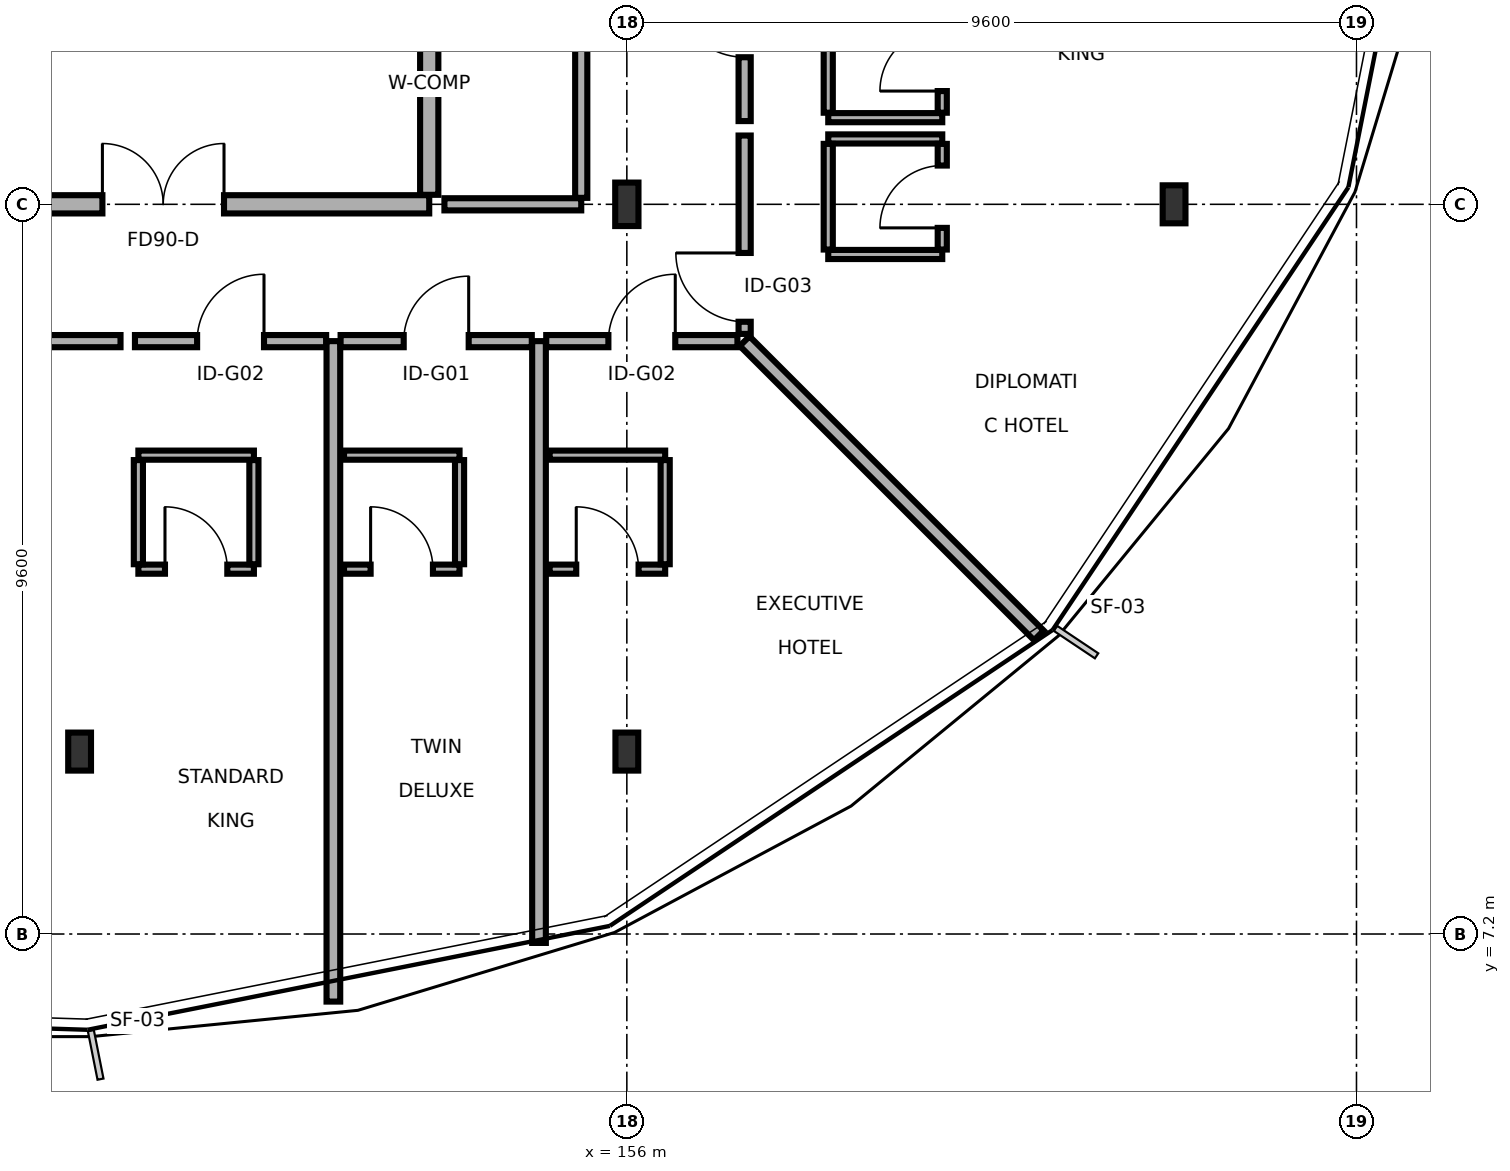
"""IFC4 building model, lengths in metres.
Left out: names, types, materials, properties, quantities, classifications, styles, units other than length and angle.
Written with IfcOpenShell. Run it as: python <this file> out.ifc"""

import sys

from ifc_helpers import new_model, si_unit, direction, frame, frame_2d, origin, origin_2d, place, context, subcontext, project, spatial, rectangle, i_section, extrude, element, fill, save


model = new_model("IFC4")
c1 = context("Model", 3, precision=1e-05, world=origin(), true_north=direction((0.0, 1.0)))
c2 = subcontext(c1, "Body", "Model", "MODEL_VIEW")
j1 = project(units=[si_unit("LENGTHUNIT", "METRE"), si_unit("PLANEANGLEUNIT", "RADIAN")], contexts=[c1])
p1 = place(None, origin())
s1 = spatial("IfcSite", under=j1, at=p1, CompositionType="ELEMENT")
p2 = place(p1, origin())
s2 = spatial("IfcBuilding", under=s1, at=p2, CompositionType="ELEMENT")
p3 = place(p2, frame((0.0, 0.0, 24.9)))
s3 = spatial("IfcBuildingStorey", under=s2, at=p3, CompositionType="ELEMENT", Elevation=24.9)
p4 = place(p3, frame((156.0, 16.8, 0.0), z_axis=(0.0, 0.0, 1.0), x_axis=(1.0, 0.0, 0.0)))
e1 = element("IfcColumn", 1, at=p4, inside=s3, PredefinedType="COLUMN", context=c2, shape_type="SweptSolid", body=[
    extrude(i_section(OverallWidth=0.306, OverallDepth=0.572, WebThickness=0.021, FlangeThickness=0.04, FilletRadius=0.027, at=origin_2d()), origin(), (0.0, 0.0, 1.0), 3.4),
])
for number, where, z_axis, x_axis in (
    (2, (148.8, 9.6, 0.0), (0.0, 0.0, 1.0), (1.0, 0.0, 0.0)),
    (3, (156.0, 9.6, 0.0), (0.0, 0.0, 1.0), (1.0, 0.0, 0.0)),
    (4, (163.2, 16.8, 0.0), (0.0, 0.0, 1.0), (1.0, 0.0, 0.0)),
):
    element("IfcColumn", number, at=place(p3, frame(where, z_axis=z_axis, x_axis=x_axis)), inside=s3, PredefinedType="COLUMN", context=c2, shape_type="SweptSolid", body=[
        extrude(i_section(OverallWidth=0.3, OverallDepth=0.5, WebThickness=0.014, FlangeThickness=0.028, FilletRadius=0.027, at=origin_2d()), origin(), (0.0, 0.0, 1.0), 3.4),
    ])
p5 = place(p3, frame((146.4, 16.8, 0.0), z_axis=(0.0, 0.0, 1.0), x_axis=(1.0, 0.0, 0.0)))
e5 = element("IfcWall", 5, at=p5, inside=s3, PredefinedType="SOLIDWALL", context=c2, shape_type="SweptSolid", body=[
    extrude(rectangle(XDim=7.0, YDim=0.24, at=frame_2d((3.5, 0.0))), origin(), (0.0, 0.0, 1.0), 2.725),
])
p6 = place(p5, frame((2.7, 0.0, 0.0)))
e6 = element("IfcOpeningElement", 6, at=p6, cuts=e5, PredefinedType="OPENING", context=c2, shape_type="SweptSolid", body=[
    extrude(rectangle(XDim=1.6, YDim=2.2, at=frame_2d((0.8, 1.1))), frame((0.0, 0.13, 0.0), z_axis=(0.0, -1.0, 0.0), x_axis=(1.0, 0.0, 0.0)), (0.0, 0.0, 1.0), 0.26),
])
p7 = place(p3, frame((153.4, 16.925, 0.0), z_axis=(0.0, 0.0, 1.0), x_axis=(0.0, 1.0, 0.0)))
e7 = element("IfcWall", 7, at=p7, inside=s3, PredefinedType="SOLIDWALL", context=c2, shape_type="SweptSolid", body=[
    extrude(rectangle(XDim=2.925, YDim=0.24, at=frame_2d((1.462, 0.0))), origin(), (0.0, 0.0, 1.0), 2.725),
])
p8 = place(p3, frame((153.6, 16.8, 0.0), z_axis=(0.0, 0.0, 1.0), x_axis=(1.0, 0.0, 0.0)))
e8 = element("IfcWall", 8, at=p8, inside=s3, PredefinedType="PARTITIONING", context=c2, shape_type="SweptSolid", body=[
    extrude(rectangle(XDim=1.8, YDim=0.16, at=frame_2d((0.9, 0.0))), origin(), (0.0, 0.0, 1.0), 2.725),
])
p9 = place(p3, frame((155.4, 16.885, 0.0), z_axis=(0.0, 0.0, 1.0), x_axis=(0.0, 1.0, 0.0)))
e9 = element("IfcWall", 9, at=p9, inside=s3, PredefinedType="PARTITIONING", context=c2, shape_type="SweptSolid", body=[
    extrude(rectangle(XDim=12.03, YDim=0.16, at=frame_2d((6.015, 0.0))), origin(), (0.0, 0.0, 1.0), 2.725),
])
p10 = place(p9, frame((5.365, 0.0, 0.0)))
e10 = element("IfcOpeningElement", 10, at=p10, cuts=e9, PredefinedType="OPENING", context=c2, shape_type="SweptSolid", body=[
    extrude(rectangle(XDim=1.3, YDim=2.2, at=frame_2d((0.65, 1.1))), frame((0.0, 0.09, 0.0), z_axis=(0.0, -1.0, 0.0), x_axis=(1.0, 0.0, 0.0)), (0.0, 0.0, 1.0), 0.18),
])
p11 = place(p3, frame((141.412, 15.0, 0.0), z_axis=(0.0, 0.0, 1.0), x_axis=(1.0, 0.0, 0.0)))
e11 = element("IfcWall", 11, at=p11, inside=s3, PredefinedType="PARTITIONING", context=c2, shape_type="SweptSolid", body=[
    extrude(rectangle(XDim=7.927, YDim=0.16, at=frame_2d((3.963, 0.0))), origin(), (0.0, 0.0, 1.0), 2.725),
])
p12 = place(p11, frame((3.213, 0.0, 0.0)))
e12 = element("IfcOpeningElement", 12, at=p12, cuts=e11, PredefinedType="OPENING", context=c2, shape_type="SweptSolid", body=[
    extrude(rectangle(XDim=1.5, YDim=2.25, at=frame_2d((0.75, 1.125))), frame((0.0, 0.09, 0.0), z_axis=(0.0, -1.0, 0.0), x_axis=(1.0, 0.0, 0.0)), (0.0, 0.0, 1.0), 0.18),
])
p13 = place(p3, frame((149.528, 15.0, 0.0), z_axis=(0.0, 0.0, 1.0), x_axis=(1.0, 0.0, 0.0)))
e13 = element("IfcWall", 13, at=p13, inside=s3, PredefinedType="PARTITIONING", context=c2, shape_type="SweptSolid", body=[
    extrude(rectangle(XDim=2.516, YDim=0.16, at=frame_2d((1.258, 0.0))), origin(), (0.0, 0.0, 1.0), 3.19),
])
p14 = place(p13, frame((0.818, 0.0, 0.0)))
e14 = element("IfcOpeningElement", 14, at=p14, cuts=e13, PredefinedType="OPENING", context=c2, shape_type="SweptSolid", body=[
    extrude(rectangle(XDim=0.88, YDim=2.05, at=frame_2d((0.44, 1.025))), frame((0.0, 0.09, 0.0), z_axis=(0.0, -1.0, 0.0), x_axis=(1.0, 0.0, 0.0)), (0.0, 0.0, 1.0), 0.18),
])
p15 = place(p3, frame((149.573, 12.0, 0.0), z_axis=(0.0, 0.0, 1.0), x_axis=(1.0, 0.0, 0.0)))
e15 = element("IfcWall", 15, at=p15, inside=s3, PredefinedType="PARTITIONING", context=c2, shape_type="SweptSolid", body=[
    extrude(rectangle(XDim=1.52, YDim=0.12, at=frame_2d((0.76, 0.0))), origin(), (0.0, 0.0, 1.0), 3.19),
])
p16 = place(p15, frame((0.35, 0.0, 0.0)))
e16 = element("IfcOpeningElement", 16, at=p16, cuts=e15, PredefinedType="OPENING", context=c2, shape_type="SweptSolid", body=[
    extrude(rectangle(XDim=0.82, YDim=2.08, at=frame_2d((0.41, 1.04))), frame((0.0, 0.07, 0.0), z_axis=(0.0, -1.0, 0.0), x_axis=(1.0, 0.0, 0.0)), (0.0, 0.0, 1.0), 0.14),
])
p17 = place(p3, frame((149.573, 13.5, 0.0), z_axis=(0.0, 0.0, 1.0), x_axis=(1.0, 0.0, 0.0)))
e17 = element("IfcWall", 17, at=p17, inside=s3, PredefinedType="PARTITIONING", context=c2, shape_type="SweptSolid", body=[
    extrude(rectangle(XDim=1.52, YDim=0.12, at=frame_2d((0.76, 0.0))), origin(), (0.0, 0.0, 1.0), 3.19),
])
for number, where, z_axis, x_axis in (
    (18, (149.573, 12.065, 0.0), (0.0, 0.0, 1.0), (0.0, 1.0, 0.0)),
    (19, (151.093, 12.065, 0.0), (0.0, 0.0, 1.0), (0.0, 1.0, 0.0)),
):
    element("IfcWall", number, at=place(p3, frame(where, z_axis=z_axis, x_axis=x_axis)), inside=s3, PredefinedType="PARTITIONING", context=c2, shape_type="SweptSolid", body=[
        extrude(rectangle(XDim=1.37, YDim=0.12, at=frame_2d((0.685, 0.0))), origin(), (0.0, 0.0, 1.0), 3.19),
    ])
p18 = place(p3, frame((152.139, 6.311, 0.0), z_axis=(0.0, 0.0, 1.0), x_axis=(0.0, 1.0, 0.0)))
e20 = element("IfcWall", 20, at=p18, inside=s3, PredefinedType="PARTITIONING", context=c2, shape_type="SweptSolid", body=[
    extrude(rectangle(XDim=8.689, YDim=0.18, at=frame_2d((4.344, 0.0))), origin(), (0.0, 0.0, 1.0), 2.675),
])
p19 = place(p3, frame((152.234, 15.0, 0.0), z_axis=(0.0, 0.0, 1.0), x_axis=(1.0, 0.0, 0.0)))
e21 = element("IfcWall", 21, at=p19, inside=s3, PredefinedType="PARTITIONING", context=c2, shape_type="SweptSolid", body=[
    extrude(rectangle(XDim=2.516, YDim=0.16, at=frame_2d((1.258, 0.0))), origin(), (0.0, 0.0, 1.0), 3.19),
])
p20 = place(p19, frame((0.83, 0.0, 0.0)))
e22 = element("IfcOpeningElement", 22, at=p20, cuts=e21, PredefinedType="OPENING", context=c2, shape_type="SweptSolid", body=[
    extrude(rectangle(XDim=0.855, YDim=2.05, at=frame_2d((0.427, 1.025))), frame((0.0, 0.09, 0.0), z_axis=(0.0, -1.0, 0.0), x_axis=(1.0, 0.0, 0.0)), (0.0, 0.0, 1.0), 0.18),
])
p21 = place(p3, frame((152.279, 12.0, 0.0), z_axis=(0.0, 0.0, 1.0), x_axis=(1.0, 0.0, 0.0)))
e23 = element("IfcWall", 23, at=p21, inside=s3, PredefinedType="PARTITIONING", context=c2, shape_type="SweptSolid", body=[
    extrude(rectangle(XDim=1.52, YDim=0.12, at=frame_2d((0.76, 0.0))), origin(), (0.0, 0.0, 1.0), 3.19),
])
p22 = place(p21, frame((0.35, 0.0, 0.0)))
e24 = element("IfcOpeningElement", 24, at=p22, cuts=e23, PredefinedType="OPENING", context=c2, shape_type="SweptSolid", body=[
    extrude(rectangle(XDim=0.82, YDim=2.08, at=frame_2d((0.41, 1.04))), frame((0.0, 0.07, 0.0), z_axis=(0.0, -1.0, 0.0), x_axis=(1.0, 0.0, 0.0)), (0.0, 0.0, 1.0), 0.14),
])
p23 = place(p3, frame((152.279, 13.5, 0.0), z_axis=(0.0, 0.0, 1.0), x_axis=(1.0, 0.0, 0.0)))
e25 = element("IfcWall", 25, at=p23, inside=s3, PredefinedType="PARTITIONING", context=c2, shape_type="SweptSolid", body=[
    extrude(rectangle(XDim=1.52, YDim=0.12, at=frame_2d((0.76, 0.0))), origin(), (0.0, 0.0, 1.0), 3.19),
])
p24 = place(p3, frame((153.799, 12.065, 0.0), z_axis=(0.0, 0.0, 1.0), x_axis=(0.0, 1.0, 0.0)))
e26 = element("IfcWall", 26, at=p24, inside=s3, PredefinedType="PARTITIONING", context=c2, shape_type="SweptSolid", body=[
    extrude(rectangle(XDim=1.37, YDim=0.12, at=frame_2d((0.685, 0.0))), origin(), (0.0, 0.0, 1.0), 3.19),
])
p25 = place(p3, frame((154.844, 7.083, 0.0), z_axis=(0.0, 0.0, 1.0), x_axis=(0.0, 1.0, 0.0)))
e27 = element("IfcWall", 27, at=p25, inside=s3, PredefinedType="PARTITIONING", context=c2, shape_type="SweptSolid", body=[
    extrude(rectangle(XDim=7.917, YDim=0.18, at=frame_2d((3.958, 0.0))), origin(), (0.0, 0.0, 1.0), 2.675),
])
p26 = place(p3, frame((154.939, 15.0, 0.0), z_axis=(0.0, 0.0, 1.0), x_axis=(1.0, 0.0, 0.0)))
e28 = element("IfcWall", 28, at=p26, inside=s3, PredefinedType="PARTITIONING", context=c2, shape_type="SweptSolid", body=[
    extrude(rectangle(XDim=2.516, YDim=0.16, at=frame_2d((1.258, 0.0))), origin(), (0.0, 0.0, 1.0), 2.725),
])
p27 = place(p26, frame((0.818, 0.0, 0.0)))
e29 = element("IfcOpeningElement", 29, at=p27, cuts=e28, PredefinedType="OPENING", context=c2, shape_type="SweptSolid", body=[
    extrude(rectangle(XDim=0.88, YDim=2.05, at=frame_2d((0.44, 1.025))), frame((0.0, 0.09, 0.0), z_axis=(0.0, -1.0, 0.0), x_axis=(1.0, 0.0, 0.0)), (0.0, 0.0, 1.0), 0.18),
])
p28 = place(p3, frame((154.984, 12.0, 0.0), z_axis=(0.0, 0.0, 1.0), x_axis=(1.0, 0.0, 0.0)))
e30 = element("IfcWall", 30, at=p28, inside=s3, PredefinedType="PARTITIONING", context=c2, shape_type="SweptSolid", body=[
    extrude(rectangle(XDim=1.52, YDim=0.12, at=frame_2d((0.76, 0.0))), origin(), (0.0, 0.0, 1.0), 2.725),
])
p29 = place(p28, frame((0.35, 0.0, 0.0)))
e31 = element("IfcOpeningElement", 31, at=p29, cuts=e30, PredefinedType="OPENING", context=c2, shape_type="SweptSolid", body=[
    extrude(rectangle(XDim=0.82, YDim=2.08, at=frame_2d((0.41, 1.04))), frame((0.0, 0.07, 0.0), z_axis=(0.0, -1.0, 0.0), x_axis=(1.0, 0.0, 0.0)), (0.0, 0.0, 1.0), 0.14),
])
p30 = place(p3, frame((154.984, 13.5, 0.0), z_axis=(0.0, 0.0, 1.0), x_axis=(1.0, 0.0, 0.0)))
e32 = element("IfcWall", 32, at=p30, inside=s3, PredefinedType="PARTITIONING", context=c2, shape_type="SweptSolid", body=[
    extrude(rectangle(XDim=1.52, YDim=0.12, at=frame_2d((0.76, 0.0))), origin(), (0.0, 0.0, 1.0), 2.725),
])
p31 = place(p3, frame((156.504, 12.065, 0.0), z_axis=(0.0, 0.0, 1.0), x_axis=(0.0, 1.0, 0.0)))
e33 = element("IfcWall", 33, at=p31, inside=s3, PredefinedType="PARTITIONING", context=c2, shape_type="SweptSolid", body=[
    extrude(rectangle(XDim=1.37, YDim=0.12, at=frame_2d((0.685, 0.0))), origin(), (0.0, 0.0, 1.0), 3.19),
])
p32 = place(p3, frame((157.55, 15.0, 0.0), z_axis=(0.0, 0.0, 1.0), x_axis=(0.707106781187, -0.707106781187, 0.0)))
e34 = element("IfcWall", 34, at=p32, inside=s3, PredefinedType="PARTITIONING", context=c2, shape_type="SweptSolid", body=[
    extrude(rectangle(XDim=5.475, YDim=0.18, at=frame_2d((2.737, 0.0))), origin(), (0.0, 0.0, 1.0), 2.675),
])
p33 = place(p3, frame((157.55, 15.095, 0.0), z_axis=(0.0, 0.0, 1.0), x_axis=(0.0, 1.0, 0.0)))
e35 = element("IfcWall", 35, at=p33, inside=s3, PredefinedType="PARTITIONING", context=c2, shape_type="SweptSolid", body=[
    extrude(rectangle(XDim=2.61, YDim=0.16, at=frame_2d((1.305, 0.0))), origin(), (0.0, 0.0, 1.0), 2.725),
])
p34 = place(p33, frame((0.16, 0.0, 0.0)))
e36 = element("IfcOpeningElement", 36, at=p34, cuts=e35, PredefinedType="OPENING", context=c2, shape_type="SweptSolid", body=[
    extrude(rectangle(XDim=0.905, YDim=2.05, at=frame_2d((0.453, 1.025))), frame((0.0, 0.09, 0.0), z_axis=(0.0, -1.0, 0.0), x_axis=(1.0, 0.0, 0.0)), (0.0, 0.0, 1.0), 0.18),
])
for number, where, z_axis, x_axis in (
    (37, (158.65, 16.14, 0.0), (0.0, 0.0, 1.0), (1.0, 0.0, 0.0)),
    (38, (158.65, 17.66, 0.0), (0.0, 0.0, 1.0), (1.0, 0.0, 0.0)),
):
    element("IfcWall", number, at=place(p3, frame(where, z_axis=z_axis, x_axis=x_axis)), inside=s3, PredefinedType="PARTITIONING", context=c2, shape_type="SweptSolid", body=[
        extrude(rectangle(XDim=1.5, YDim=0.12, at=frame_2d((0.75, 0.0))), origin(), (0.0, 0.0, 1.0), 3.19),
    ])
p35 = place(p3, frame((158.65, 16.205, 0.0), z_axis=(0.0, 0.0, 1.0), x_axis=(0.0, 1.0, 0.0)))
e39 = element("IfcWall", 39, at=p35, inside=s3, PredefinedType="PARTITIONING", context=c2, shape_type="SweptSolid", body=[
    extrude(rectangle(XDim=1.39, YDim=0.12, at=frame_2d((0.695, 0.0))), origin(), (0.0, 0.0, 1.0), 2.725),
])
p36 = place(p3, frame((160.15, 16.205, 0.0), z_axis=(0.0, 0.0, 1.0), x_axis=(0.0, 1.0, 0.0)))
e40 = element("IfcWall", 40, at=p36, inside=s3, PredefinedType="PARTITIONING", context=c2, shape_type="SweptSolid", body=[
    extrude(rectangle(XDim=1.39, YDim=0.12, at=frame_2d((0.695, 0.0))), origin(), (0.0, 0.0, 1.0), 2.725),
])
p37 = place(p36, frame((0.285, 0.0, 0.0)))
e41 = element("IfcOpeningElement", 41, at=p37, cuts=e40, PredefinedType="OPENING", context=c2, shape_type="SweptSolid", body=[
    extrude(rectangle(XDim=0.82, YDim=2.08, at=frame_2d((0.41, 1.04))), frame((0.0, 0.07, 0.0), z_axis=(0.0, -1.0, 0.0), x_axis=(1.0, 0.0, 0.0)), (0.0, 0.0, 1.0), 0.14),
])
p38 = place(p3, frame((157.55, 17.895, 0.0), z_axis=(0.0, 0.0, 1.0), x_axis=(0.0, 1.0, 0.0)))
e42 = element("IfcWall", 42, at=p38, inside=s3, PredefinedType="PARTITIONING", context=c2, shape_type="SweptSolid", body=[
    extrude(rectangle(XDim=2.61, YDim=0.16, at=frame_2d((1.305, 0.0))), origin(), (0.0, 0.0, 1.0), 3.19),
])
p39 = place(p38, frame((0.84, 0.0, 0.0)))
e43 = element("IfcOpeningElement", 43, at=p39, cuts=e42, PredefinedType="OPENING", context=c2, shape_type="SweptSolid", body=[
    extrude(rectangle(XDim=0.93, YDim=2.05, at=frame_2d((0.465, 1.025))), frame((0.0, 0.09, 0.0), z_axis=(0.0, -1.0, 0.0), x_axis=(1.0, 0.0, 0.0)), (0.0, 0.0, 1.0), 0.18),
])
p40 = place(p3, frame((158.65, 17.94, 0.0), z_axis=(0.0, 0.0, 1.0), x_axis=(1.0, 0.0, 0.0)))
e44 = element("IfcWall", 44, at=p40, inside=s3, PredefinedType="PARTITIONING", context=c2, shape_type="SweptSolid", body=[
    extrude(rectangle(XDim=1.5, YDim=0.12, at=frame_2d((0.75, 0.0))), origin(), (0.0, 0.0, 1.0), 3.19),
])
p41 = place(p3, frame((158.65, 18.005, 0.0), z_axis=(0.0, 0.0, 1.0), x_axis=(0.0, 1.0, 0.0)))
e45 = element("IfcWall", 45, at=p41, inside=s3, PredefinedType="PARTITIONING", context=c2, shape_type="SweptSolid", body=[
    extrude(rectangle(XDim=1.39, YDim=0.12, at=frame_2d((0.695, 0.0))), origin(), (0.0, 0.0, 1.0), 3.19),
])
p42 = place(p3, frame((160.15, 18.005, 0.0), z_axis=(0.0, 0.0, 1.0), x_axis=(0.0, 1.0, 0.0)))
e46 = element("IfcWall", 46, at=p42, inside=s3, PredefinedType="PARTITIONING", context=c2, shape_type="SweptSolid", body=[
    extrude(rectangle(XDim=1.39, YDim=0.12, at=frame_2d((0.695, 0.0))), origin(), (0.0, 0.0, 1.0), 3.19),
])
p43 = place(p42, frame((0.285, 0.0, 0.0)))
e47 = element("IfcOpeningElement", 47, at=p43, cuts=e46, PredefinedType="OPENING", context=c2, shape_type="SweptSolid", body=[
    extrude(rectangle(XDim=0.82, YDim=2.08, at=frame_2d((0.41, 1.04))), frame((0.0, 0.07, 0.0), z_axis=(0.0, -1.0, 0.0), x_axis=(1.0, 0.0, 0.0)), (0.0, 0.0, 1.0), 0.14),
])
p44 = place(p6, origin())
e48 = element("IfcDoor", 48, at=p44, inside=s3, OperationType="DOUBLE_DOOR_SINGLE_SWING", PredefinedType="DOOR", context=c2, shape_type="SweptSolid", body=[
    extrude(rectangle(XDim=1.6, YDim=2.2, at=frame_2d((0.8, 1.1))), frame((0.0, 0.025, 0.0), z_axis=(0.0, -1.0, 0.0), x_axis=(1.0, 0.0, 0.0)), (0.0, 0.0, 1.0), 0.05),
])
fill(e6, e48)
p45 = place(p14, origin())
e49 = element("IfcDoor", 49, at=p45, inside=s3, OperationType="SINGLE_SWING_RIGHT", PredefinedType="DOOR", context=c2, shape_type="SweptSolid", body=[
    extrude(rectangle(XDim=0.88, YDim=2.05, at=frame_2d((0.44, 1.025))), frame((0.0, 0.025, 0.0), z_axis=(0.0, -1.0, 0.0), x_axis=(1.0, 0.0, 0.0)), (0.0, 0.0, 1.0), 0.05),
])
fill(e14, e49)
p46 = place(p16, origin())
e50 = element("IfcDoor", 50, at=p46, inside=s3, OperationType="SINGLE_SWING_LEFT", PredefinedType="DOOR", context=c2, shape_type="SweptSolid", body=[
    extrude(rectangle(XDim=0.82, YDim=2.08, at=frame_2d((0.41, 1.04))), frame((0.0, 0.025, 0.0), z_axis=(0.0, -1.0, 0.0), x_axis=(1.0, 0.0, 0.0)), (0.0, 0.0, 1.0), 0.05),
])
fill(e16, e50)
p47 = place(p20, origin())
e51 = element("IfcDoor", 51, at=p47, inside=s3, OperationType="SINGLE_SWING_RIGHT", PredefinedType="DOOR", context=c2, shape_type="SweptSolid", body=[
    extrude(rectangle(XDim=0.855, YDim=2.05, at=frame_2d((0.427, 1.025))), frame((0.0, 0.025, 0.0), z_axis=(0.0, -1.0, 0.0), x_axis=(1.0, 0.0, 0.0)), (0.0, 0.0, 1.0), 0.05),
])
fill(e22, e51)
p48 = place(p22, origin())
e52 = element("IfcDoor", 52, at=p48, inside=s3, OperationType="SINGLE_SWING_LEFT", PredefinedType="DOOR", context=c2, shape_type="SweptSolid", body=[
    extrude(rectangle(XDim=0.82, YDim=2.08, at=frame_2d((0.41, 1.04))), frame((0.0, 0.025, 0.0), z_axis=(0.0, -1.0, 0.0), x_axis=(1.0, 0.0, 0.0)), (0.0, 0.0, 1.0), 0.05),
])
fill(e24, e52)
p49 = place(p27, origin())
e53 = element("IfcDoor", 53, at=p49, inside=s3, OperationType="SINGLE_SWING_RIGHT", PredefinedType="DOOR", context=c2, shape_type="SweptSolid", body=[
    extrude(rectangle(XDim=0.88, YDim=2.05, at=frame_2d((0.44, 1.025))), frame((0.0, 0.025, 0.0), z_axis=(0.0, -1.0, 0.0), x_axis=(1.0, 0.0, 0.0)), (0.0, 0.0, 1.0), 0.05),
])
fill(e29, e53)
p50 = place(p29, origin())
e54 = element("IfcDoor", 54, at=p50, inside=s3, OperationType="SINGLE_SWING_LEFT", PredefinedType="DOOR", context=c2, shape_type="SweptSolid", body=[
    extrude(rectangle(XDim=0.82, YDim=2.08, at=frame_2d((0.41, 1.04))), frame((0.0, 0.025, 0.0), z_axis=(0.0, -1.0, 0.0), x_axis=(1.0, 0.0, 0.0)), (0.0, 0.0, 1.0), 0.05),
])
fill(e31, e54)
p51 = place(p34, origin())
e55 = element("IfcDoor", 55, at=p51, inside=s3, OperationType="SINGLE_SWING_RIGHT", PredefinedType="DOOR", context=c2, shape_type="SweptSolid", body=[
    extrude(rectangle(XDim=0.905, YDim=2.05, at=frame_2d((0.453, 1.025))), frame((0.0, 0.025, 0.0), z_axis=(0.0, -1.0, 0.0), x_axis=(1.0, 0.0, 0.0)), (0.0, 0.0, 1.0), 0.05),
])
fill(e36, e55)
p52 = place(p37, origin())
e56 = element("IfcDoor", 56, at=p52, inside=s3, OperationType="SINGLE_SWING_LEFT", PredefinedType="DOOR", context=c2, shape_type="SweptSolid", body=[
    extrude(rectangle(XDim=0.82, YDim=2.08, at=frame_2d((0.41, 1.04))), frame((0.0, 0.025, 0.0), z_axis=(0.0, -1.0, 0.0), x_axis=(1.0, 0.0, 0.0)), (0.0, 0.0, 1.0), 0.05),
])
fill(e41, e56)
p53 = place(p39, origin())
e57 = element("IfcDoor", 57, at=p53, inside=s3, OperationType="SINGLE_SWING_RIGHT", PredefinedType="DOOR", context=c2, shape_type="SweptSolid", body=[
    extrude(rectangle(XDim=0.93, YDim=2.05, at=frame_2d((0.465, 1.025))), frame((0.0, 0.025, 0.0), z_axis=(0.0, -1.0, 0.0), x_axis=(1.0, 0.0, 0.0)), (0.0, 0.0, 1.0), 0.05),
])
fill(e43, e57)
p54 = place(p43, origin())
e58 = element("IfcDoor", 58, at=p54, inside=s3, OperationType="SINGLE_SWING_LEFT", PredefinedType="DOOR", context=c2, shape_type="SweptSolid", body=[
    extrude(rectangle(XDim=0.82, YDim=2.08, at=frame_2d((0.41, 1.04))), frame((0.0, 0.025, 0.0), z_axis=(0.0, -1.0, 0.0), x_axis=(1.0, 0.0, 0.0)), (0.0, 0.0, 1.0), 0.05),
])
fill(e47, e58)
save(model, sys.argv[1])
